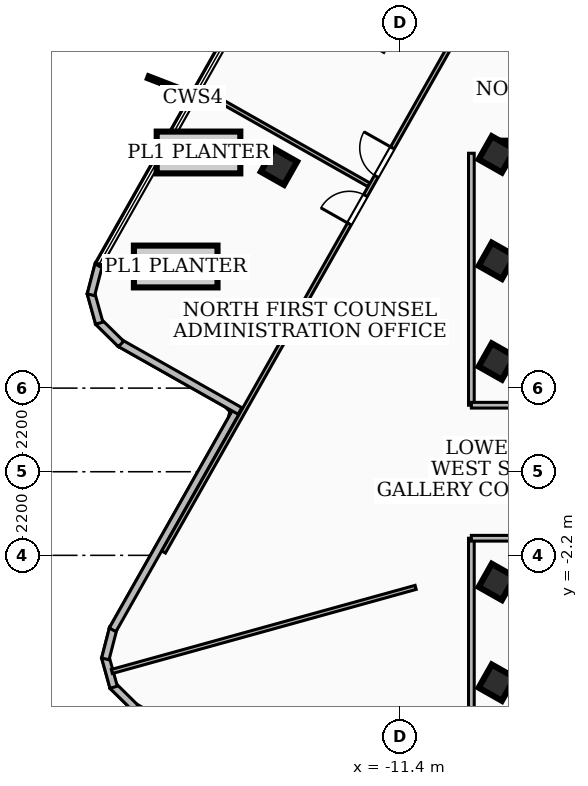
"""IFC4 building model, lengths in metres.
Left out: names, types, materials, properties, quantities, classifications, styles, units other than length and angle.
Written with IfcOpenShell. Run it as: python <this file> out.ifc"""

import sys

from ifc_helpers import new_model, si_unit, direction, frame, frame_2d, origin, origin_2d, place, context, subcontext, project, spatial, rectangle, extrude, element, fill, save


model = new_model("IFC4")
c1 = context("Model", 3, precision=1e-05, world=origin(), true_north=direction((0.0, 1.0)))
c2 = subcontext(c1, "Body", "Model", "MODEL_VIEW")
j1 = project(units=[si_unit("LENGTHUNIT", "METRE"), si_unit("PLANEANGLEUNIT", "RADIAN")], contexts=[c1])
p1 = place(None, origin())
s1 = spatial("IfcSite", under=j1, at=p1, CompositionType="ELEMENT")
p2 = place(p1, origin())
s2 = spatial("IfcBuilding", under=s1, at=p2, CompositionType="ELEMENT")
p3 = place(p2, frame((0.0, 0.0, 281.7)))
s3 = spatial("IfcBuildingStorey", under=s2, at=p3, CompositionType="ELEMENT", Elevation=281.7)
p4 = place(p3, frame((-8.78, 8.51, 0.0), z_axis=(0.0, 0.0, 1.0), x_axis=(1.0, 0.0, 0.0)))
e1 = element("IfcWall", 1, at=p4, inside=s3, PredefinedType="SHEAR", context=c2, shape_type="SweptSolid", body=[
    extrude(rectangle(XDim=17.56, YDim=0.4, at=frame_2d((8.78, 0.0))), origin(), (0.0, 0.0, 1.0), 3.12),
])
for number, where, z_axis, x_axis in (
    (2, (-8.85, -5.55, 0.0), (0.0, 0.0, 1.0), (0.493, 0.87, 0.0)),
    (3, (-8.85, -2.9, 0.0), (0.0, 0.0, 1.0), (0.493, 0.87, 0.0)),
    (4, (-8.85, 2.9, 0.0), (0.0, 0.0, 1.0), (0.493, 0.87, 0.0)),
    (5, (-8.85, 5.55, 0.0), (0.0, 0.0, 1.0), (0.493, 0.87, 0.0)),
    (6, (-8.85, 8.35, 0.0), (0.0, 0.0, 1.0), (0.493, 0.87, 0.0)),
    (7, (-14.583, 8.026, 0.0), (0.0, 0.0, 1.0), (0.493, 0.87, 0.0)),
):
    element("IfcColumn", number, at=place(p3, frame(where, z_axis=z_axis, x_axis=x_axis)), inside=s3, PredefinedType="COLUMN", context=c2, shape_type="SweptSolid", body=[
        extrude(rectangle(XDim=0.7, YDim=0.7, at=origin_2d()), origin(), (0.0, 0.0, 1.0), 3.42),
    ])
p5 = place(p3, frame((4.16, -18.96, 0.0), z_axis=(0.0, 0.0, 1.0), x_axis=(-0.870210232131, 0.492680577956, 0.0)))
e8 = element("IfcWall", 8, at=p5, inside=s3, PredefinedType="SOLIDWALL", context=c2, shape_type="SweptSolid", body=[
    extrude(rectangle(XDim=25.923, YDim=0.2, at=frame_2d((12.962, 0.0))), origin(), (0.0, 0.0, 1.0), 3.12),
])
p6 = place(p5, frame((19.32, 0.0, 0.85)))
e9 = element("IfcOpeningElement", 9, at=p6, cuts=e8, PredefinedType="OPENING", context=c2, shape_type="SweptSolid", body=[
    extrude(rectangle(XDim=1.8, YDim=1.6, at=frame_2d((0.9, 0.8))), frame((0.0, 0.11, 0.0), z_axis=(0.0, -1.0, 0.0), x_axis=(1.0, 0.0, 0.0)), (0.0, 0.0, 1.0), 0.22),
])
p7 = place(p3, frame((-18.359, -6.218, 0.0), z_axis=(0.0, 0.0, 1.0), x_axis=(-0.712466161804, 0.701706468749, 0.0)))
e10 = element("IfcWall", 10, at=p7, inside=s3, PredefinedType="SOLIDWALL", context=c2, shape_type="SweptSolid", body=[
    extrude(rectangle(XDim=0.84, YDim=0.2, at=frame_2d((0.42, 0.0))), origin(), (0.0, 0.0, 1.0), 3.12),
])
p8 = place(p3, frame((-18.932, -5.671, 0.0), z_axis=(0.0, 0.0, 1.0), x_axis=(-0.268377126675, 0.963313924885, 0.0)))
e11 = element("IfcWall", 11, at=p8, inside=s3, PredefinedType="SOLIDWALL", context=c2, shape_type="SweptSolid", body=[
    extrude(rectangle(XDim=0.824, YDim=0.2, at=frame_2d((0.412, 0.0))), origin(), (0.0, 0.0, 1.0), 3.12),
])
p9 = place(p3, frame((-19.152, -4.925, 0.0), z_axis=(0.0, 0.0, 1.0), x_axis=(0.250891369276, 0.968015248239, 0.0)))
e12 = element("IfcWall", 12, at=p9, inside=s3, PredefinedType="SOLIDWALL", context=c2, shape_type="SweptSolid", body=[
    extrude(rectangle(XDim=0.838, YDim=0.2, at=frame_2d((0.419, 0.0))), origin(), (0.0, 0.0, 1.0), 3.12),
])
p10 = place(p3, frame((-18.96, -4.16, 0.0), z_axis=(0.0, 0.0, 1.0), x_axis=(0.492441425139, 0.870345588147, 0.0)))
e13 = element("IfcWall", 13, at=p10, inside=s3, PredefinedType="SOLIDWALL", context=c2, shape_type="SweptSolid", body=[
    extrude(rectangle(XDim=6.742, YDim=0.2, at=frame_2d((3.371, 0.0))), origin(), (0.0, 0.0, 1.0), 3.12),
])
p11 = place(p3, frame((-15.609, 1.599, 0.0), z_axis=(0.0, 0.0, 1.0), x_axis=(-0.87036421417, 0.49240850388, 0.0)))
e14 = element("IfcWall", 14, at=p11, inside=s3, PredefinedType="SOLIDWALL", context=c2, shape_type="SweptSolid", body=[
    extrude(rectangle(XDim=3.641, YDim=0.2, at=frame_2d((1.821, 0.0))), origin(), (0.0, 0.0, 1.0), 3.12),
])
p12 = place(p3, frame((-18.738, 3.362, 0.0), z_axis=(0.0, 0.0, 1.0), x_axis=(-0.712468358306, 0.70170423856, 0.0)))
e15 = element("IfcWall", 15, at=p12, inside=s3, PredefinedType="SOLIDWALL", context=c2, shape_type="SweptSolid", body=[
    extrude(rectangle(XDim=0.839, YDim=0.2, at=frame_2d((0.419, 0.0))), origin(), (0.0, 0.0, 1.0), 3.12),
])
p13 = place(p3, frame((-19.311, 3.909, 0.0), z_axis=(0.0, 0.0, 1.0), x_axis=(-0.267720149776, 0.963496715824, 0.0)))
e16 = element("IfcWall", 16, at=p13, inside=s3, PredefinedType="SOLIDWALL", context=c2, shape_type="SweptSolid", body=[
    extrude(rectangle(XDim=0.825, YDim=0.2, at=frame_2d((0.413, 0.0))), origin(), (0.0, 0.0, 1.0), 3.12),
])
p14 = place(p3, frame((-19.531, 4.656, 0.0), z_axis=(0.0, 0.0, 1.0), x_axis=(0.250618286331, 0.968085985105, 0.0)))
e17 = element("IfcWall", 17, at=p14, inside=s3, PredefinedType="SOLIDWALL", context=c2, shape_type="SweptSolid", body=[
    extrude(rectangle(XDim=0.838, YDim=0.2, at=frame_2d((0.419, 0.0))), origin(), (0.0, 0.0, 1.0), 3.12),
])
p15 = place(p3, frame((-9.52, 1.75, 0.0), z_axis=(0.0, 0.0, 1.0), x_axis=(0.0, 1.0, 0.0)))
e18 = element("IfcWall", 18, at=p15, inside=s3, PredefinedType="PARTITIONING", context=c2, shape_type="SweptSolid", body=[
    extrude(rectangle(XDim=6.63, YDim=0.15, at=frame_2d((3.315, 0.0))), origin(), (0.0, 0.0, 1.0), 2.49),
])
p16 = place(p3, frame((-7.85, 1.75, 0.0), z_axis=(0.0, 0.0, 1.0), x_axis=(-1.0, 0.0, 0.0)))
e19 = element("IfcWall", 19, at=p16, inside=s3, PredefinedType="PARTITIONING", context=c2, shape_type="SweptSolid", body=[
    extrude(rectangle(XDim=1.67, YDim=0.15, at=frame_2d((0.835, 0.0))), origin(), (0.0, 0.0, 1.0), 2.35),
])
p17 = place(p3, frame((-9.52, -8.38, 0.0), z_axis=(0.0, 0.0, 1.0), x_axis=(0.0, 1.0, 0.0)))
e20 = element("IfcWall", 20, at=p17, inside=s3, PredefinedType="PARTITIONING", context=c2, shape_type="SweptSolid", body=[
    extrude(rectangle(XDim=6.63, YDim=0.15, at=frame_2d((3.315, 0.0))), origin(), (0.0, 0.0, 1.0), 3.12),
])
p18 = place(p3, frame((-7.85, -1.75, 0.0), z_axis=(0.0, 0.0, 1.0), x_axis=(-1.0, 0.0, 0.0)))
e21 = element("IfcWall", 21, at=p18, inside=s3, PredefinedType="PARTITIONING", context=c2, shape_type="SweptSolid", body=[
    extrude(rectangle(XDim=1.67, YDim=0.15, at=frame_2d((0.835, 0.0))), origin(), (0.0, 0.0, 1.0), 2.35),
])
p19 = place(p3, frame((-10.986, -3.043, 0.0), z_axis=(0.0, 0.0, 1.0), x_axis=(-0.963747373359, -0.266816416929, 0.0)))
e22 = element("IfcWall", 22, at=p19, inside=s3, PredefinedType="PARTITIONING", context=c2, shape_type="SweptSolid", body=[
    extrude(rectangle(XDim=8.295, YDim=0.11, at=frame_2d((4.147, 0.0))), origin(), (0.0, 0.0, 1.0), 3.12),
])
p20 = place(p3, frame((-12.216, 7.549, 0.0), z_axis=(0.0, 0.0, 1.0), x_axis=(-0.870245204201, 0.492618802488, 0.0)))
e23 = element("IfcWall", 23, at=p20, inside=s3, PredefinedType="PARTITIONING", context=c2, shape_type="SweptSolid", body=[
    extrude(rectangle(XDim=5.085, YDim=0.11, at=frame_2d((2.542, 0.0))), origin(), (0.0, 0.0, 1.0), 2.49),
])
p21 = place(p3, frame((-17.619, -2.113, 0.0), z_axis=(0.0, 0.0, 1.0), x_axis=(0.492746831558, 0.870172718482, 0.0)))
e24 = element("IfcWall", 24, at=p21, inside=s3, PredefinedType="PARTITIONING", context=c2, shape_type="SweptSolid", body=[
    extrude(rectangle(XDim=20.54, YDim=0.11, at=frame_2d((10.27, 0.0))), origin(), (0.0, 0.0, 1.0), 2.49),
])
p22 = place(p21, frame((11.36, 0.0, 0.0)))
e25 = element("IfcOpeningElement", 25, at=p22, cuts=e24, PredefinedType="OPENING", context=c2, shape_type="SweptSolid", body=[
    extrude(rectangle(XDim=0.86, YDim=2.04, at=frame_2d((0.43, 1.02))), frame((0.0, 0.065, 0.0), z_axis=(0.0, -1.0, 0.0), x_axis=(1.0, 0.0, 0.0)), (0.0, 0.0, 1.0), 0.13),
])
p23 = place(p21, frame((9.92, 0.0, 0.0)))
e26 = element("IfcOpeningElement", 26, at=p23, cuts=e24, PredefinedType="OPENING", context=c2, shape_type="SweptSolid", body=[
    extrude(rectangle(XDim=0.86, YDim=2.04, at=frame_2d((0.43, 1.02))), frame((0.0, 0.065, 0.0), z_axis=(0.0, -1.0, 0.0), x_axis=(1.0, 0.0, 0.0)), (0.0, 0.0, 1.0), 0.13),
])
p24 = place(p22, origin())
e27 = element("IfcDoor", 27, at=p24, inside=s3, OperationType="SINGLE_SWING_RIGHT", PredefinedType="DOOR", context=c2, shape_type="SweptSolid", body=[
    extrude(rectangle(XDim=0.86, YDim=2.04, at=frame_2d((0.43, 1.02))), frame((0.0, 0.025, 0.0), z_axis=(0.0, -1.0, 0.0), x_axis=(1.0, 0.0, 0.0)), (0.0, 0.0, 1.0), 0.05),
])
fill(e25, e27)
p25 = place(p23, origin())
e28 = element("IfcDoor", 28, at=p25, inside=s3, OperationType="SINGLE_SWING_LEFT", PredefinedType="DOOR", context=c2, shape_type="SweptSolid", body=[
    extrude(rectangle(XDim=0.86, YDim=2.04, at=frame_2d((0.43, 1.02))), frame((0.0, 0.025, 0.0), z_axis=(0.0, -1.0, 0.0), x_axis=(1.0, 0.0, 0.0)), (0.0, 0.0, 1.0), 0.05),
])
fill(e26, e28)
save(model, sys.argv[1])
